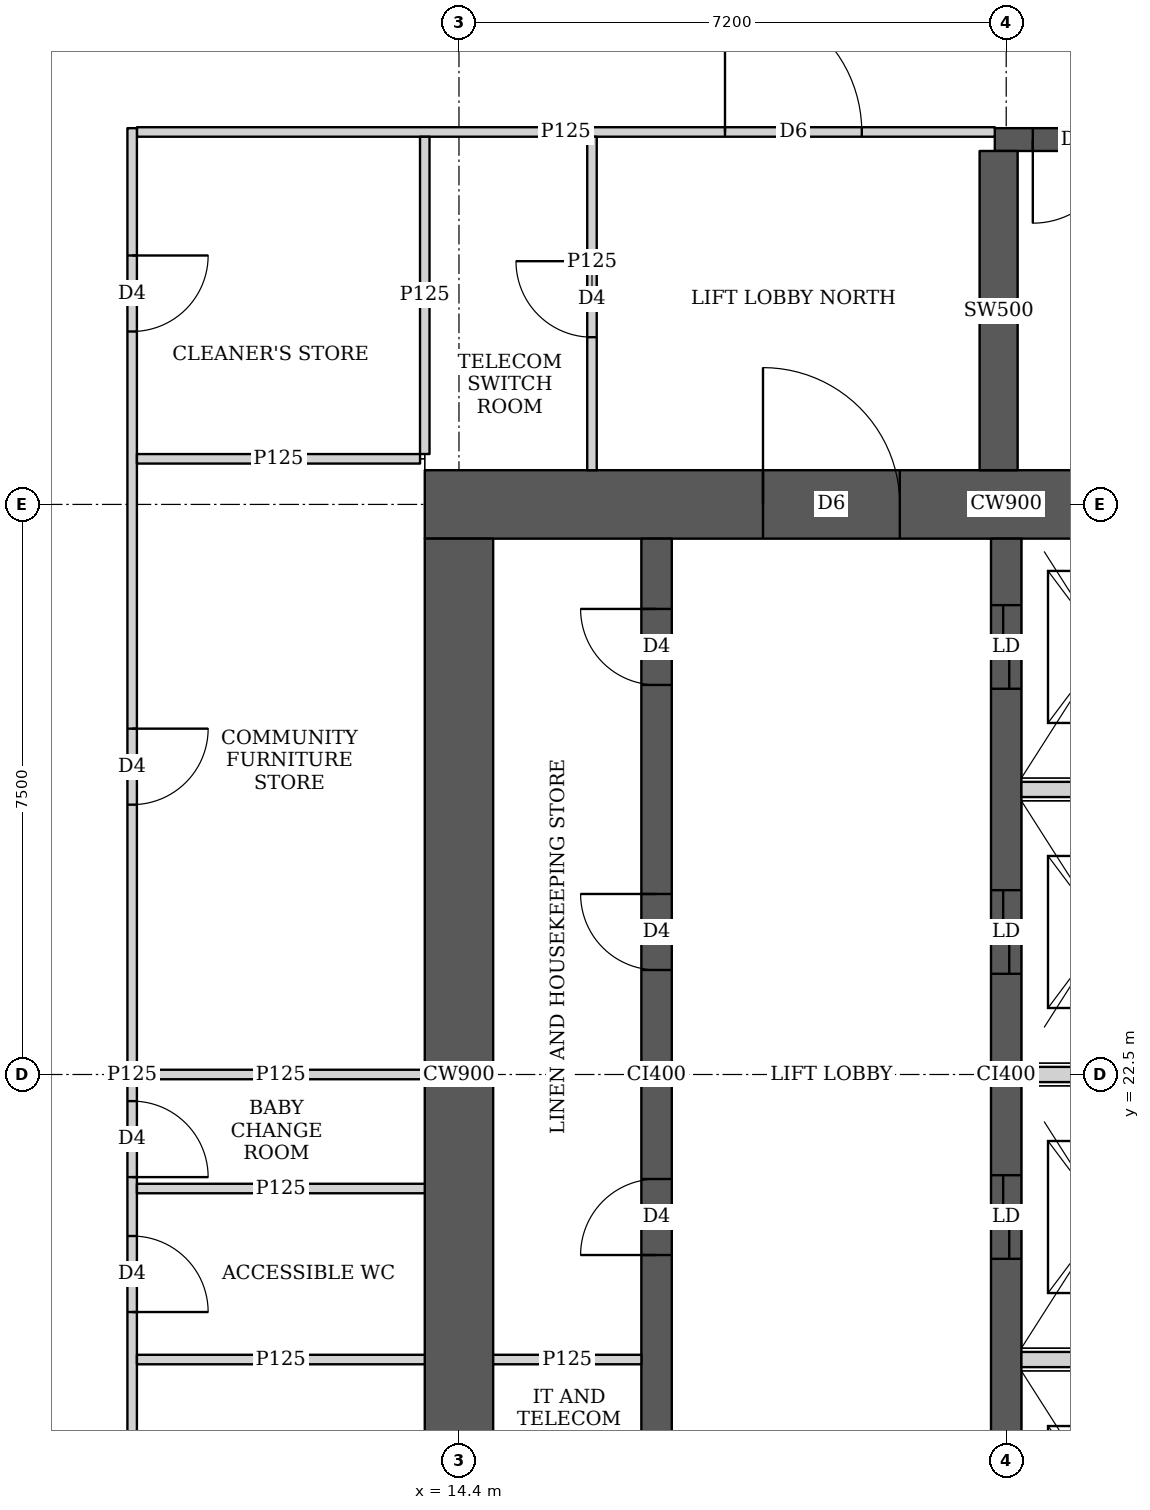
"""IFC4 building model, lengths in metres.
Left out: names, types, materials, properties, quantities, classifications, styles, units other than length and angle.
Written with IfcOpenShell. Run it as: python <this file> out.ifc"""

import sys

from ifc_helpers import new_model, si_unit, direction, frame, frame_2d, origin, place, context, subcontext, project, spatial, rectangle, extrude, element, fill, save


model = new_model("IFC4")
c1 = context("Model", 3, precision=1e-05, world=origin(), true_north=direction((0.0, 1.0)))
c2 = subcontext(c1, "Body", "Model", "MODEL_VIEW")
j1 = project(units=[si_unit("LENGTHUNIT", "METRE"), si_unit("PLANEANGLEUNIT", "RADIAN")], contexts=[c1])
p1 = place(None, origin())
s1 = spatial("IfcSite", under=j1, at=p1, CompositionType="ELEMENT")
p2 = place(p1, origin())
s2 = spatial("IfcBuilding", under=s1, at=p2, CompositionType="ELEMENT")
p3 = place(p2, frame((0.0, 0.0, 188.3)))
s3 = spatial("IfcBuildingStorey", under=s2, at=p3, CompositionType="ELEMENT", Elevation=188.3)
p4 = place(p3, frame((13.95, 30.0, 0.0), z_axis=(0.0, 0.0, 1.0), x_axis=(1.0, 0.0, 0.0)))
e1 = element("IfcWall", 1, at=p4, inside=s3, PredefinedType="SHEAR", context=c2, shape_type="SweptSolid", body=[
    extrude(rectangle(XDim=15.3, YDim=0.9, at=frame_2d((7.65, 0.0))), origin(), (0.0, 0.0, 1.0), 5.4),
])
p5 = place(p4, frame((4.45, 0.0, 0.0)))
e2 = element("IfcOpeningElement", 2, at=p5, cuts=e1, PredefinedType="OPENING", context=c2, shape_type="SweptSolid", body=[
    extrude(rectangle(XDim=1.8, YDim=2.1, at=frame_2d((0.9, 1.05))), frame((0.0, 0.46, 0.0), z_axis=(0.0, -1.0, 0.0), x_axis=(1.0, 0.0, 0.0)), (0.0, 0.0, 1.0), 0.92),
])
p6 = place(p4, frame((10.7, 0.0, 0.0)))
e3 = element("IfcOpeningElement", 3, at=p6, cuts=e1, PredefinedType="OPENING", context=c2, shape_type="SweptSolid", body=[
    extrude(rectangle(XDim=1.1, YDim=2.1, at=frame_2d((0.55, 1.05))), frame((0.0, 0.46, 0.0), z_axis=(0.0, -1.0, 0.0), x_axis=(1.0, 0.0, 0.0)), (0.0, 0.0, 1.0), 0.92),
])
p7 = place(p3, frame((14.4, 15.45, 0.0), z_axis=(0.0, 0.0, 1.0), x_axis=(0.0, 1.0, 0.0)))
e4 = element("IfcWall", 4, at=p7, inside=s3, PredefinedType="SHEAR", context=c2, shape_type="SweptSolid", body=[
    extrude(rectangle(XDim=14.1, YDim=0.9, at=frame_2d((7.05, 0.0))), origin(), (0.0, 0.0, 1.0), 5.4),
])
p8 = place(p3, frame((17.0, 15.45, 0.0), z_axis=(0.0, 0.0, 1.0), x_axis=(0.0, 1.0, 0.0)))
e5 = element("IfcWall", 5, at=p8, inside=s3, PredefinedType="SHEAR", context=c2, shape_type="SweptSolid", body=[
    extrude(rectangle(XDim=14.1, YDim=0.4, at=frame_2d((7.05, 0.0))), origin(), (0.0, 0.0, 1.0), 5.4),
])
p9 = place(p8, frame((0.925, 0.0, 0.0)))
e6 = element("IfcOpeningElement", 6, at=p9, cuts=e5, PredefinedType="OPENING", context=c2, shape_type="SweptSolid", body=[
    extrude(rectangle(XDim=1.0, YDim=2.1, at=frame_2d((0.5, 1.05))), frame((0.0, 0.21, 0.0), z_axis=(0.0, -1.0, 0.0), x_axis=(1.0, 0.0, 0.0)), (0.0, 0.0, 1.0), 0.42),
])
p10 = place(p8, frame((4.675, 0.0, 0.0)))
e7 = element("IfcOpeningElement", 7, at=p10, cuts=e5, PredefinedType="OPENING", context=c2, shape_type="SweptSolid", body=[
    extrude(rectangle(XDim=1.0, YDim=2.1, at=frame_2d((0.5, 1.05))), frame((0.0, 0.21, 0.0), z_axis=(0.0, -1.0, 0.0), x_axis=(1.0, 0.0, 0.0)), (0.0, 0.0, 1.0), 0.42),
])
p11 = place(p8, frame((8.425, 0.0, 0.0)))
e8 = element("IfcOpeningElement", 8, at=p11, cuts=e5, PredefinedType="OPENING", context=c2, shape_type="SweptSolid", body=[
    extrude(rectangle(XDim=1.0, YDim=2.1, at=frame_2d((0.5, 1.05))), frame((0.0, 0.21, 0.0), z_axis=(0.0, -1.0, 0.0), x_axis=(1.0, 0.0, 0.0)), (0.0, 0.0, 1.0), 0.42),
])
p12 = place(p8, frame((12.175, 0.0, 0.0)))
e9 = element("IfcOpeningElement", 9, at=p12, cuts=e5, PredefinedType="OPENING", context=c2, shape_type="SweptSolid", body=[
    extrude(rectangle(XDim=1.0, YDim=2.1, at=frame_2d((0.5, 1.05))), frame((0.0, 0.21, 0.0), z_axis=(0.0, -1.0, 0.0), x_axis=(1.0, 0.0, 0.0)), (0.0, 0.0, 1.0), 0.42),
])
p13 = place(p3, frame((21.6, 15.45, 0.0), z_axis=(0.0, 0.0, 1.0), x_axis=(0.0, 1.0, 0.0)))
e10 = element("IfcWall", 10, at=p13, inside=s3, PredefinedType="SHEAR", context=c2, shape_type="SweptSolid", body=[
    extrude(rectangle(XDim=14.1, YDim=0.4, at=frame_2d((7.05, 0.0))), origin(), (0.0, 0.0, 1.0), 5.4),
])
p14 = place(p13, frame((0.875, 0.0, 0.0)))
e11 = element("IfcOpeningElement", 11, at=p14, cuts=e10, PredefinedType="OPENING", context=c2, shape_type="SweptSolid", body=[
    extrude(rectangle(XDim=1.1, YDim=2.1, at=frame_2d((0.55, 1.05))), frame((0.0, 0.21, 0.0), z_axis=(0.0, -1.0, 0.0), x_axis=(1.0, 0.0, 0.0)), (0.0, 0.0, 1.0), 0.42),
])
p15 = place(p13, frame((4.625, 0.0, 0.0)))
e12 = element("IfcOpeningElement", 12, at=p15, cuts=e10, PredefinedType="OPENING", context=c2, shape_type="SweptSolid", body=[
    extrude(rectangle(XDim=1.1, YDim=2.1, at=frame_2d((0.55, 1.05))), frame((0.0, 0.21, 0.0), z_axis=(0.0, -1.0, 0.0), x_axis=(1.0, 0.0, 0.0)), (0.0, 0.0, 1.0), 0.42),
])
p16 = place(p13, frame((8.375, 0.0, 0.0)))
e13 = element("IfcOpeningElement", 13, at=p16, cuts=e10, PredefinedType="OPENING", context=c2, shape_type="SweptSolid", body=[
    extrude(rectangle(XDim=1.1, YDim=2.1, at=frame_2d((0.55, 1.05))), frame((0.0, 0.21, 0.0), z_axis=(0.0, -1.0, 0.0), x_axis=(1.0, 0.0, 0.0)), (0.0, 0.0, 1.0), 0.42),
])
p17 = place(p13, frame((12.125, 0.0, 0.0)))
e14 = element("IfcOpeningElement", 14, at=p17, cuts=e10, PredefinedType="OPENING", context=c2, shape_type="SweptSolid", body=[
    extrude(rectangle(XDim=1.1, YDim=2.1, at=frame_2d((0.55, 1.05))), frame((0.0, 0.21, 0.0), z_axis=(0.0, -1.0, 0.0), x_axis=(1.0, 0.0, 0.0)), (0.0, 0.0, 1.0), 0.42),
])
p18 = place(p3, frame((21.45, 34.8, 0.0), z_axis=(0.0, 0.0, 1.0), x_axis=(1.0, 0.0, 0.0)))
e15 = element("IfcWall", 15, at=p18, inside=s3, PredefinedType="SHEAR", context=c2, shape_type="SweptSolid", body=[
    extrude(rectangle(XDim=7.5, YDim=0.3, at=frame_2d((3.75, 0.0))), origin(), (0.0, 0.0, 1.0), 5.4),
])
p19 = place(p18, frame((0.5, 0.0, 0.0)))
e16 = element("IfcOpeningElement", 16, at=p19, cuts=e15, PredefinedType="OPENING", context=c2, shape_type="SweptSolid", body=[
    extrude(rectangle(XDim=1.1, YDim=2.1, at=frame_2d((0.55, 1.05))), frame((0.0, 0.16, 0.0), z_axis=(0.0, -1.0, 0.0), x_axis=(1.0, 0.0, 0.0)), (0.0, 0.0, 1.0), 0.32),
])
p20 = place(p3, frame((21.5, 30.45, 0.0), z_axis=(0.0, 0.0, 1.0), x_axis=(0.0, 1.0, 0.0)))
e17 = element("IfcWall", 17, at=p20, inside=s3, PredefinedType="SHEAR", context=c2, shape_type="SweptSolid", body=[
    extrude(rectangle(XDim=4.2, YDim=0.5, at=frame_2d((2.1, 0.0))), origin(), (0.0, 0.0, 1.0), 5.4),
])
p21 = place(p3, frame((10.1, 10.05, 0.0), z_axis=(0.0, 0.0, 1.0), x_axis=(0.0, 1.0, 0.0)))
e18 = element("IfcWall", 18, at=p21, inside=s3, PredefinedType="PARTITIONING", context=c2, shape_type="SweptSolid", body=[
    extrude(rectangle(XDim=24.9, YDim=0.125, at=frame_2d((12.45, 0.0))), origin(), (0.0, 0.0, 1.0), 3.55),
])
p22 = place(p21, frame((1.675, 0.0, 0.0)))
e19 = element("IfcOpeningElement", 19, at=p22, cuts=e18, PredefinedType="OPENING", context=c2, shape_type="SweptSolid", body=[
    extrude(rectangle(XDim=1.0, YDim=2.1, at=frame_2d((0.5, 1.05))), frame((0.0, 0.073, 0.0), z_axis=(0.0, -1.0, 0.0), x_axis=(1.0, 0.0, 0.0)), (0.0, 0.0, 1.0), 0.145),
])
p23 = place(p21, frame((16.0, 0.0, 0.0)))
e20 = element("IfcOpeningElement", 20, at=p23, cuts=e18, PredefinedType="OPENING", context=c2, shape_type="SweptSolid", body=[
    extrude(rectangle(XDim=1.0, YDim=2.1, at=frame_2d((0.5, 1.05))), frame((0.0, 0.073, 0.0), z_axis=(0.0, -1.0, 0.0), x_axis=(1.0, 0.0, 0.0)), (0.0, 0.0, 1.0), 0.145),
])
p24 = place(p21, frame((22.225, 0.0, 0.0)))
e21 = element("IfcOpeningElement", 21, at=p24, cuts=e18, PredefinedType="OPENING", context=c2, shape_type="SweptSolid", body=[
    extrude(rectangle(XDim=1.0, YDim=2.1, at=frame_2d((0.5, 1.05))), frame((0.0, 0.073, 0.0), z_axis=(0.0, -1.0, 0.0), x_axis=(1.0, 0.0, 0.0)), (0.0, 0.0, 1.0), 0.145),
])
p25 = place(p21, frame((6.025, 0.0, 0.0)))
e22 = element("IfcOpeningElement", 22, at=p25, cuts=e18, PredefinedType="OPENING", context=c2, shape_type="SweptSolid", body=[
    extrude(rectangle(XDim=1.0, YDim=2.1, at=frame_2d((0.5, 1.05))), frame((0.0, 0.073, 0.0), z_axis=(0.0, -1.0, 0.0), x_axis=(1.0, 0.0, 0.0)), (0.0, 0.0, 1.0), 0.145),
])
p26 = place(p21, frame((9.325, 0.0, 0.0)))
e23 = element("IfcOpeningElement", 23, at=p26, cuts=e18, PredefinedType="OPENING", context=c2, shape_type="SweptSolid", body=[
    extrude(rectangle(XDim=1.0, YDim=2.1, at=frame_2d((0.5, 1.05))), frame((0.0, 0.073, 0.0), z_axis=(0.0, -1.0, 0.0), x_axis=(1.0, 0.0, 0.0)), (0.0, 0.0, 1.0), 0.145),
])
p27 = place(p21, frame((11.1, 0.0, 0.0)))
e24 = element("IfcOpeningElement", 24, at=p27, cuts=e18, PredefinedType="OPENING", context=c2, shape_type="SweptSolid", body=[
    extrude(rectangle(XDim=1.0, YDim=2.1, at=frame_2d((0.5, 1.05))), frame((0.0, 0.073, 0.0), z_axis=(0.0, -1.0, 0.0), x_axis=(1.0, 0.0, 0.0)), (0.0, 0.0, 1.0), 0.145),
])
p28 = place(p3, frame((10.163, 22.5, 0.0), z_axis=(0.0, 0.0, 1.0), x_axis=(1.0, 0.0, 0.0)))
e25 = element("IfcWall", 25, at=p28, inside=s3, PredefinedType="PARTITIONING", context=c2, shape_type="SweptSolid", body=[
    extrude(rectangle(XDim=3.787, YDim=0.125, at=frame_2d((1.894, 0.0))), origin(), (0.0, 0.0, 1.0), 3.55),
])
p29 = place(p3, frame((10.163, 30.6, 0.0), z_axis=(0.0, 0.0, 1.0), x_axis=(1.0, 0.0, 0.0)))
e26 = element("IfcWall", 26, at=p29, inside=s3, PredefinedType="PARTITIONING", context=c2, shape_type="SweptSolid", body=[
    extrude(rectangle(XDim=3.725, YDim=0.125, at=frame_2d((1.862, 0.0))), origin(), (0.0, 0.0, 1.0), 3.55),
])
p30 = place(p3, frame((13.95, 30.663, 0.0), z_axis=(0.0, 0.0, 1.0), x_axis=(0.0, 1.0, 0.0)))
e27 = element("IfcWall", 27, at=p30, inside=s3, PredefinedType="PARTITIONING", context=c2, shape_type="SweptSolid", body=[
    extrude(rectangle(XDim=4.174, YDim=0.125, at=frame_2d((2.087, 0.0))), origin(), (0.0, 0.0, 1.0), 3.55),
])
p31 = place(p3, frame((10.163, 34.9, 0.0), z_axis=(0.0, 0.0, 1.0), x_axis=(1.0, 0.0, 0.0)))
e28 = element("IfcWall", 28, at=p31, inside=s3, PredefinedType="PARTITIONING", context=c2, shape_type="SweptSolid", body=[
    extrude(rectangle(XDim=11.287, YDim=0.125, at=frame_2d((5.644, 0.0))), origin(), (0.0, 0.0, 1.0), 3.15),
])
p32 = place(p31, frame((7.737, 0.0, 0.0)))
e29 = element("IfcOpeningElement", 29, at=p32, cuts=e28, PredefinedType="OPENING", context=c2, shape_type="SweptSolid", body=[
    extrude(rectangle(XDim=1.8, YDim=2.1, at=frame_2d((0.9, 1.05))), frame((0.0, 0.073, 0.0), z_axis=(0.0, -1.0, 0.0), x_axis=(1.0, 0.0, 0.0)), (0.0, 0.0, 1.0), 0.145),
])
p33 = place(p3, frame((16.15, 30.45, 0.0), z_axis=(0.0, 0.0, 1.0), x_axis=(0.0, 1.0, 0.0)))
e30 = element("IfcWall", 30, at=p33, inside=s3, PredefinedType="PARTITIONING", context=c2, shape_type="SweptSolid", body=[
    extrude(rectangle(XDim=4.387, YDim=0.125, at=frame_2d((2.193, 0.0))), origin(), (0.0, 0.0, 1.0), 5.15),
])
p34 = place(p33, frame((1.75, 0.0, 0.0)))
e31 = element("IfcOpeningElement", 31, at=p34, cuts=e30, PredefinedType="OPENING", context=c2, shape_type="SweptSolid", body=[
    extrude(rectangle(XDim=1.0, YDim=2.1, at=frame_2d((0.5, 1.05))), frame((0.0, 0.073, 0.0), z_axis=(0.0, -1.0, 0.0), x_axis=(1.0, 0.0, 0.0)), (0.0, 0.0, 1.0), 0.145),
])
for number, where, z_axis, x_axis in (
    (32, (10.163, 18.75, 0.0), (0.0, 0.0, 1.0), (1.0, 0.0, 0.0)),
    (33, (10.163, 21.0, 0.0), (0.0, 0.0, 1.0), (1.0, 0.0, 0.0)),
):
    element("IfcWall", number, at=place(p3, frame(where, z_axis=z_axis, x_axis=x_axis)), inside=s3, PredefinedType="PARTITIONING", context=c2, shape_type="SweptSolid", body=[
        extrude(rectangle(XDim=3.787, YDim=0.125, at=frame_2d((1.894, 0.0))), origin(), (0.0, 0.0, 1.0), 5.15),
    ])
p35 = place(p3, frame((14.85, 18.75, 0.0), z_axis=(0.0, 0.0, 1.0), x_axis=(1.0, 0.0, 0.0)))
e34 = element("IfcWall", 34, at=p35, inside=s3, PredefinedType="PARTITIONING", context=c2, shape_type="SweptSolid", body=[
    extrude(rectangle(XDim=1.95, YDim=0.125, at=frame_2d((0.975, 0.0))), origin(), (0.0, 0.0, 1.0), 5.15),
])
for number, where, z_axis, x_axis in (
    (35, (21.8, 18.75, 0.0), (0.0, 0.0, 1.0), (1.0, 0.0, 0.0)),
    (36, (21.8, 22.5, 0.0), (0.0, 0.0, 1.0), (1.0, 0.0, 0.0)),
    (37, (21.8, 26.25, 0.0), (0.0, 0.0, 1.0), (1.0, 0.0, 0.0)),
):
    element("IfcWall", number, at=place(p3, frame(where, z_axis=z_axis, x_axis=x_axis)), inside=s3, PredefinedType="SOLIDWALL", context=c2, shape_type="SweptSolid", body=[
        extrude(rectangle(XDim=2.2, YDim=0.2, at=frame_2d((1.1, 0.0))), origin(), (0.0, 0.0, 1.0), 5.15),
    ])
p36 = place(p23, origin())
e38 = element("IfcDoor", 38, at=p36, inside=s3, OperationType="SINGLE_SWING_LEFT", PredefinedType="DOOR", context=c2, shape_type="SweptSolid", body=[
    extrude(rectangle(XDim=1.0, YDim=2.1, at=frame_2d((0.5, 1.05))), frame((0.0, 0.025, 0.0), z_axis=(0.0, -1.0, 0.0), x_axis=(1.0, 0.0, 0.0)), (0.0, 0.0, 1.0), 0.05),
])
fill(e20, e38)
p37 = place(p24, origin())
e39 = element("IfcDoor", 39, at=p37, inside=s3, OperationType="SINGLE_SWING_LEFT", PredefinedType="DOOR", context=c2, shape_type="SweptSolid", body=[
    extrude(rectangle(XDim=1.0, YDim=2.1, at=frame_2d((0.5, 1.05))), frame((0.0, 0.025, 0.0), z_axis=(0.0, -1.0, 0.0), x_axis=(1.0, 0.0, 0.0)), (0.0, 0.0, 1.0), 0.05),
])
fill(e21, e39)
p38 = place(p34, origin())
e40 = element("IfcDoor", 40, at=p38, inside=s3, OperationType="SINGLE_SWING_RIGHT", PredefinedType="DOOR", context=c2, shape_type="SweptSolid", body=[
    extrude(rectangle(XDim=1.0, YDim=2.1, at=frame_2d((0.5, 1.05))), frame((0.0, 0.025, 0.0), z_axis=(0.0, -1.0, 0.0), x_axis=(1.0, 0.0, 0.0)), (0.0, 0.0, 1.0), 0.05),
])
fill(e31, e40)
p39 = place(p32, origin())
e41 = element("IfcDoor", 41, at=p39, inside=s3, OperationType="DOUBLE_DOOR_SINGLE_SWING", PredefinedType="DOOR", context=c2, shape_type="SweptSolid", body=[
    extrude(rectangle(XDim=1.8, YDim=2.1, at=frame_2d((0.9, 1.05))), frame((0.0, 0.025, 0.0), z_axis=(0.0, -1.0, 0.0), x_axis=(1.0, 0.0, 0.0)), (0.0, 0.0, 1.0), 0.05),
])
fill(e29, e41)
p40 = place(p26, origin())
e42 = element("IfcDoor", 42, at=p40, inside=s3, OperationType="SINGLE_SWING_RIGHT", PredefinedType="DOOR", context=c2, shape_type="SweptSolid", body=[
    extrude(rectangle(XDim=1.0, YDim=2.1, at=frame_2d((0.5, 1.05))), frame((0.0, 0.025, 0.0), z_axis=(0.0, -1.0, 0.0), x_axis=(1.0, 0.0, 0.0)), (0.0, 0.0, 1.0), 0.05),
])
fill(e23, e42)
p41 = place(p27, origin())
e43 = element("IfcDoor", 43, at=p41, inside=s3, OperationType="SINGLE_SWING_RIGHT", PredefinedType="DOOR", context=c2, shape_type="SweptSolid", body=[
    extrude(rectangle(XDim=1.0, YDim=2.1, at=frame_2d((0.5, 1.05))), frame((0.0, 0.025, 0.0), z_axis=(0.0, -1.0, 0.0), x_axis=(1.0, 0.0, 0.0)), (0.0, 0.0, 1.0), 0.05),
])
fill(e24, e43)
p42 = place(p10, origin())
e44 = element("IfcDoor", 44, at=p42, inside=s3, OperationType="SINGLE_SWING_LEFT", PredefinedType="DOOR", context=c2, shape_type="SweptSolid", body=[
    extrude(rectangle(XDim=1.0, YDim=2.1, at=frame_2d((0.5, 1.05))), frame((0.0, 0.025, 0.0), z_axis=(0.0, -1.0, 0.0), x_axis=(1.0, 0.0, 0.0)), (0.0, 0.0, 1.0), 0.05),
])
fill(e7, e44)
p43 = place(p11, origin())
e45 = element("IfcDoor", 45, at=p43, inside=s3, OperationType="SINGLE_SWING_RIGHT", PredefinedType="DOOR", context=c2, shape_type="SweptSolid", body=[
    extrude(rectangle(XDim=1.0, YDim=2.1, at=frame_2d((0.5, 1.05))), frame((0.0, 0.025, 0.0), z_axis=(0.0, -1.0, 0.0), x_axis=(1.0, 0.0, 0.0)), (0.0, 0.0, 1.0), 0.05),
])
fill(e8, e45)
p44 = place(p12, origin())
e46 = element("IfcDoor", 46, at=p44, inside=s3, OperationType="SINGLE_SWING_RIGHT", PredefinedType="DOOR", context=c2, shape_type="SweptSolid", body=[
    extrude(rectangle(XDim=1.0, YDim=2.1, at=frame_2d((0.5, 1.05))), frame((0.0, 0.025, 0.0), z_axis=(0.0, -1.0, 0.0), x_axis=(1.0, 0.0, 0.0)), (0.0, 0.0, 1.0), 0.05),
])
fill(e9, e46)
p45 = place(p5, origin())
e47 = element("IfcDoor", 47, at=p45, inside=s3, OperationType="DOUBLE_DOOR_SINGLE_SWING", PredefinedType="DOOR", context=c2, shape_type="SweptSolid", body=[
    extrude(rectangle(XDim=1.8, YDim=2.1, at=frame_2d((0.9, 1.05))), frame((0.0, 0.025, 0.0), z_axis=(0.0, -1.0, 0.0), x_axis=(1.0, 0.0, 0.0)), (0.0, 0.0, 1.0), 0.05),
])
fill(e2, e47)
p46 = place(p15, origin())
e48 = element("IfcDoor", 48, at=p46, inside=s3, OperationType="DOUBLE_DOOR_SLIDING", PredefinedType="DOOR", context=c2, shape_type="SweptSolid", body=[
    extrude(rectangle(XDim=1.1, YDim=2.1, at=frame_2d((0.55, 1.05))), frame((0.0, 0.025, 0.0), z_axis=(0.0, -1.0, 0.0), x_axis=(1.0, 0.0, 0.0)), (0.0, 0.0, 1.0), 0.05),
])
fill(e12, e48)
p47 = place(p16, origin())
e49 = element("IfcDoor", 49, at=p47, inside=s3, OperationType="DOUBLE_DOOR_SLIDING", PredefinedType="DOOR", context=c2, shape_type="SweptSolid", body=[
    extrude(rectangle(XDim=1.1, YDim=2.1, at=frame_2d((0.55, 1.05))), frame((0.0, 0.025, 0.0), z_axis=(0.0, -1.0, 0.0), x_axis=(1.0, 0.0, 0.0)), (0.0, 0.0, 1.0), 0.05),
])
fill(e13, e49)
p48 = place(p17, origin())
e50 = element("IfcDoor", 50, at=p48, inside=s3, OperationType="DOUBLE_DOOR_SLIDING", PredefinedType="DOOR", context=c2, shape_type="SweptSolid", body=[
    extrude(rectangle(XDim=1.1, YDim=2.1, at=frame_2d((0.55, 1.05))), frame((0.0, 0.025, 0.0), z_axis=(0.0, -1.0, 0.0), x_axis=(1.0, 0.0, 0.0)), (0.0, 0.0, 1.0), 0.05),
])
fill(e14, e50)
p49 = place(p19, origin())
e51 = element("IfcDoor", 51, at=p49, inside=s3, OperationType="SINGLE_SWING_RIGHT", PredefinedType="DOOR", context=c2, shape_type="SweptSolid", body=[
    extrude(rectangle(XDim=1.1, YDim=2.1, at=frame_2d((0.55, 1.05))), frame((0.0, 0.025, 0.0), z_axis=(0.0, -1.0, 0.0), x_axis=(1.0, 0.0, 0.0)), (0.0, 0.0, 1.0), 0.05),
])
fill(e16, e51)
save(model, sys.argv[1])
